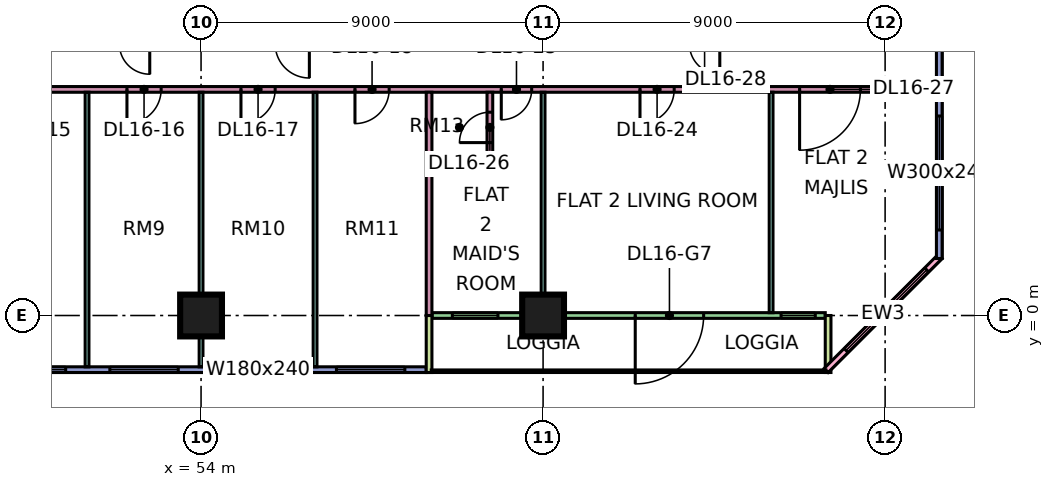
"""IFC4 building model, lengths in metres.
Left out: names, types, materials, properties, quantities, classifications, styles, units other than length and angle.
Written with IfcOpenShell. Run it as: python <this file> out.ifc"""

import sys

from ifc_helpers import new_model, si_unit, direction, frame, frame_2d, origin, origin_2d, place, context, subcontext, project, spatial, rectangle, extrude, element, fill, save


model = new_model("IFC4")
c1 = context("Model", 3, precision=1e-05, world=origin(), true_north=direction((0.0, 1.0)))
c2 = subcontext(c1, "Body", "Model", "MODEL_VIEW")
j1 = project(units=[si_unit("LENGTHUNIT", "METRE"), si_unit("PLANEANGLEUNIT", "RADIAN")], contexts=[c1])
p1 = place(None, origin())
s1 = spatial("IfcSite", under=j1, at=p1, CompositionType="ELEMENT")
p2 = place(p1, origin())
s2 = spatial("IfcBuilding", under=s1, at=p2, CompositionType="ELEMENT")
p3 = place(p2, frame((0.0, 0.0, 75.15)))
s3 = spatial("IfcBuildingStorey", under=s2, at=p3, CompositionType="ELEMENT", Elevation=75.15)
for number, where, z_axis, x_axis in (
    (1, (54.0, 0.0, 0.0), (0.0, 0.0, 1.0), (1.0, 0.0, 0.0)),
    (2, (63.0, 0.0, 0.0), (0.0, 0.0, 1.0), (1.0, 0.0, 0.0)),
):
    element("IfcColumn", number, at=place(p3, frame(where, z_axis=z_axis, x_axis=x_axis)), inside=s3, PredefinedType="COLUMN", context=c2, shape_type="SweptSolid", body=[
        extrude(rectangle(XDim=1.1, YDim=1.1, at=origin_2d()), origin(), (0.0, 0.0, 1.0), 3.75),
    ])
p4 = place(p3, frame((48.075, -1.425, 0.0), z_axis=(0.0, 0.0, 1.0), x_axis=(1.0, 0.0, 0.0)))
e3 = element("IfcWall", 3, at=p4, inside=s3, PredefinedType="SOLIDWALL", context=c2, shape_type="SweptSolid", body=[
    extrude(rectangle(XDim=11.85, YDim=0.15, at=frame_2d((5.925, 0.0))), origin(), (0.0, 0.0, 1.0), 3.35),
])
p5 = place(p4, frame((0.562, 0.0, 0.45)))
e4 = element("IfcOpeningElement", 4, at=p5, cuts=e3, PredefinedType="OPENING", context=c2, shape_type="SweptSolid", body=[
    extrude(rectangle(XDim=1.8, YDim=2.4, at=frame_2d((0.9, 1.2))), frame((0.0, 0.085, 0.0), z_axis=(0.0, -1.0, 0.0), x_axis=(1.0, 0.0, 0.0)), (0.0, 0.0, 1.0), 0.17),
])
p6 = place(p4, frame((3.525, 0.0, 0.45)))
e5 = element("IfcOpeningElement", 5, at=p6, cuts=e3, PredefinedType="OPENING", context=c2, shape_type="SweptSolid", body=[
    extrude(rectangle(XDim=1.8, YDim=2.4, at=frame_2d((0.9, 1.2))), frame((0.0, 0.085, 0.0), z_axis=(0.0, -1.0, 0.0), x_axis=(1.0, 0.0, 0.0)), (0.0, 0.0, 1.0), 0.17),
])
p7 = place(p4, frame((6.525, 0.0, 0.45)))
e6 = element("IfcOpeningElement", 6, at=p7, cuts=e3, PredefinedType="OPENING", context=c2, shape_type="SweptSolid", body=[
    extrude(rectangle(XDim=1.8, YDim=2.4, at=frame_2d((0.9, 1.2))), frame((0.0, 0.085, 0.0), z_axis=(0.0, -1.0, 0.0), x_axis=(1.0, 0.0, 0.0)), (0.0, 0.0, 1.0), 0.17),
])
p8 = place(p4, frame((9.488, 0.0, 0.45)))
e7 = element("IfcOpeningElement", 7, at=p8, cuts=e3, PredefinedType="OPENING", context=c2, shape_type="SweptSolid", body=[
    extrude(rectangle(XDim=1.8, YDim=2.4, at=frame_2d((0.9, 1.2))), frame((0.0, 0.085, 0.0), z_axis=(0.0, -1.0, 0.0), x_axis=(1.0, 0.0, 0.0)), (0.0, 0.0, 1.0), 0.17),
])
p9 = place(p3, frame((60.075, 0.0, 0.0), z_axis=(0.0, 0.0, 1.0), x_axis=(1.0, 0.0, 0.0)))
e8 = element("IfcWall", 8, at=p9, inside=s3, PredefinedType="SOLIDWALL", context=c2, shape_type="SweptSolid", body=[
    extrude(rectangle(XDim=10.35, YDim=0.15, at=frame_2d((5.175, 0.0))), origin(), (0.0, 0.0, 1.0), 3.35),
])
p10 = place(p9, frame((0.538, 0.0, 0.45)))
e9 = element("IfcOpeningElement", 9, at=p10, cuts=e8, PredefinedType="OPENING", context=c2, shape_type="SweptSolid", body=[
    extrude(rectangle(XDim=1.2, YDim=2.4, at=frame_2d((0.6, 1.2))), frame((0.0, 0.085, 0.0), z_axis=(0.0, -1.0, 0.0), x_axis=(1.0, 0.0, 0.0)), (0.0, 0.0, 1.0), 0.17),
])
p11 = place(p9, frame((5.35, 0.0, 0.0)))
e10 = element("IfcOpeningElement", 10, at=p11, cuts=e8, PredefinedType="OPENING", context=c2, shape_type="SweptSolid", body=[
    extrude(rectangle(XDim=1.8, YDim=2.4, at=frame_2d((0.9, 1.2))), frame((0.0, 0.085, 0.0), z_axis=(0.0, -1.0, 0.0), x_axis=(1.0, 0.0, 0.0)), (0.0, 0.0, 1.0), 0.17),
])
p12 = place(p9, frame((9.188, 0.0, 0.45)))
e11 = element("IfcOpeningElement", 11, at=p12, cuts=e8, PredefinedType="OPENING", context=c2, shape_type="SweptSolid", body=[
    extrude(rectangle(XDim=0.9, YDim=2.4, at=frame_2d((0.45, 1.2))), frame((0.0, 0.085, 0.0), z_axis=(0.0, -1.0, 0.0), x_axis=(1.0, 0.0, 0.0)), (0.0, 0.0, 1.0), 0.17),
])
for number, where, z_axis, x_axis in (
    (12, (60.0, -1.5, 0.0), (0.0, 0.0, 1.0), (0.0, 1.0, 0.0)),
    (13, (70.5, -1.5, 0.0), (0.0, 0.0, 1.0), (0.0, 1.0, 0.0)),
):
    element("IfcWall", number, at=place(p3, frame(where, z_axis=z_axis, x_axis=x_axis)), inside=s3, PredefinedType="SOLIDWALL", context=c2, shape_type="SweptSolid", body=[
        extrude(rectangle(XDim=1.5, YDim=0.15, at=frame_2d((0.75, 0.0))), origin(), (0.0, 0.0, 1.0), 3.35),
    ])
p13 = place(p3, frame((70.447, -1.447, 0.0), z_axis=(0.0, 0.0, 1.0), x_axis=(0.707106781187, 0.707106781187, 0.0)))
e14 = element("IfcWall", 14, at=p13, inside=s3, PredefinedType="SOLIDWALL", context=c2, shape_type="SweptSolid", body=[
    extrude(rectangle(XDim=4.243, YDim=0.15, at=frame_2d((2.121, 0.0))), origin(), (0.0, 0.0, 1.0), 3.35),
])
p14 = place(p13, frame((0.744, 0.0, 0.45)))
e15 = element("IfcOpeningElement", 15, at=p14, cuts=e14, PredefinedType="OPENING", context=c2, shape_type="SweptSolid", body=[
    extrude(rectangle(XDim=3.0, YDim=2.4, at=frame_2d((1.5, 1.2))), frame((0.0, 0.085, 0.0), z_axis=(0.0, -1.0, 0.0), x_axis=(1.0, 0.0, 0.0)), (0.0, 0.0, 1.0), 0.17),
])
p15 = place(p3, frame((73.425, 1.5, 0.0), z_axis=(0.0, 0.0, 1.0), x_axis=(0.0, 1.0, 0.0)))
e16 = element("IfcWall", 16, at=p15, inside=s3, PredefinedType="SOLIDWALL", context=c2, shape_type="SweptSolid", body=[
    extrude(rectangle(XDim=10.425, YDim=0.15, at=frame_2d((5.212, 0.0))), origin(), (0.0, 0.0, 1.0), 3.35),
])
p16 = place(p15, frame((0.75, 0.0, 0.45)))
e17 = element("IfcOpeningElement", 17, at=p16, cuts=e16, PredefinedType="OPENING", context=c2, shape_type="SweptSolid", body=[
    extrude(rectangle(XDim=3.0, YDim=2.4, at=frame_2d((1.5, 1.2))), frame((0.0, 0.085, 0.0), z_axis=(0.0, -1.0, 0.0), x_axis=(1.0, 0.0, 0.0)), (0.0, 0.0, 1.0), 0.17),
])
p17 = place(p3, frame((48.1, 5.95, 0.0), z_axis=(0.0, 0.0, 1.0), x_axis=(1.0, 0.0, 0.0)))
e18 = element("IfcWall", 18, at=p17, inside=s3, PredefinedType="PARTITIONING", context=c2, shape_type="SweptSolid", body=[
    extrude(rectangle(XDim=25.25, YDim=0.15, at=frame_2d((12.625, 0.0))), origin(), (0.0, 0.0, 1.0), 3.35),
])
p18 = place(p17, frame((0.95, 0.0, 0.0)))
e19 = element("IfcOpeningElement", 19, at=p18, cuts=e18, PredefinedType="OPENING", context=c2, shape_type="SweptSolid", body=[
    extrude(rectangle(XDim=0.9, YDim=2.1, at=frame_2d((0.45, 1.05))), frame((0.0, 0.085, 0.0), z_axis=(0.0, -1.0, 0.0), x_axis=(1.0, 0.0, 0.0)), (0.0, 0.0, 1.0), 0.17),
])
p19 = place(p17, frame((3.95, 0.0, 0.0)))
e20 = element("IfcOpeningElement", 20, at=p19, cuts=e18, PredefinedType="OPENING", context=c2, shape_type="SweptSolid", body=[
    extrude(rectangle(XDim=0.9, YDim=2.1, at=frame_2d((0.45, 1.05))), frame((0.0, 0.085, 0.0), z_axis=(0.0, -1.0, 0.0), x_axis=(1.0, 0.0, 0.0)), (0.0, 0.0, 1.0), 0.17),
])
p20 = place(p17, frame((6.95, 0.0, 0.0)))
e21 = element("IfcOpeningElement", 21, at=p20, cuts=e18, PredefinedType="OPENING", context=c2, shape_type="SweptSolid", body=[
    extrude(rectangle(XDim=0.9, YDim=2.1, at=frame_2d((0.45, 1.05))), frame((0.0, 0.085, 0.0), z_axis=(0.0, -1.0, 0.0), x_axis=(1.0, 0.0, 0.0)), (0.0, 0.0, 1.0), 0.17),
])
p21 = place(p17, frame((9.95, 0.0, 0.0)))
e22 = element("IfcOpeningElement", 22, at=p21, cuts=e18, PredefinedType="OPENING", context=c2, shape_type="SweptSolid", body=[
    extrude(rectangle(XDim=0.9, YDim=2.1, at=frame_2d((0.45, 1.05))), frame((0.0, 0.085, 0.0), z_axis=(0.0, -1.0, 0.0), x_axis=(1.0, 0.0, 0.0)), (0.0, 0.0, 1.0), 0.17),
])
p22 = place(p17, frame((17.45, 0.0, 0.0)))
e23 = element("IfcOpeningElement", 23, at=p22, cuts=e18, PredefinedType="OPENING", context=c2, shape_type="SweptSolid", body=[
    extrude(rectangle(XDim=0.9, YDim=2.1, at=frame_2d((0.45, 1.05))), frame((0.0, 0.085, 0.0), z_axis=(0.0, -1.0, 0.0), x_axis=(1.0, 0.0, 0.0)), (0.0, 0.0, 1.0), 0.17),
])
p23 = place(p17, frame((13.8, 0.0, 0.0)))
e24 = element("IfcOpeningElement", 24, at=p23, cuts=e18, PredefinedType="OPENING", context=c2, shape_type="SweptSolid", body=[
    extrude(rectangle(XDim=0.8, YDim=2.1, at=frame_2d((0.4, 1.05))), frame((0.0, 0.085, 0.0), z_axis=(0.0, -1.0, 0.0), x_axis=(1.0, 0.0, 0.0)), (0.0, 0.0, 1.0), 0.17),
])
p24 = place(p17, frame((21.65, 0.0, 0.0)))
e25 = element("IfcOpeningElement", 25, at=p24, cuts=e18, PredefinedType="OPENING", context=c2, shape_type="SweptSolid", body=[
    extrude(rectangle(XDim=1.6, YDim=2.1, at=frame_2d((0.8, 1.05))), frame((0.0, 0.085, 0.0), z_axis=(0.0, -1.0, 0.0), x_axis=(1.0, 0.0, 0.0)), (0.0, 0.0, 1.0), 0.17),
])
for number, where, z_axis, x_axis in (
    (26, (51.0, -1.351, 0.0), (0.0, 0.0, 1.0), (0.0, 1.0, 0.0)),
    (27, (54.0, -1.351, 0.0), (0.0, 0.0, 1.0), (0.0, 1.0, 0.0)),
    (28, (57.0, -1.351, 0.0), (0.0, 0.0, 1.0), (0.0, 1.0, 0.0)),
):
    element("IfcWall", number, at=place(p3, frame(where, z_axis=z_axis, x_axis=x_axis)), inside=s3, PredefinedType="PARTITIONING", context=c2, shape_type="SweptSolid", body=[
        extrude(rectangle(XDim=7.226, YDim=0.1, at=frame_2d((3.613, 0.0))), origin(), (0.0, 0.0, 1.0), 3.35),
    ])
p25 = place(p3, frame((60.0, 0.0, 0.0), z_axis=(0.0, 0.0, 1.0), x_axis=(0.0, 1.0, 0.0)))
e29 = element("IfcWall", 29, at=p25, inside=s3, PredefinedType="PARTITIONING", context=c2, shape_type="SweptSolid", body=[
    extrude(rectangle(XDim=5.875, YDim=0.15, at=frame_2d((2.938, 0.0))), origin(), (0.0, 0.0, 1.0), 3.35),
])
p26 = place(p3, frame((60.075, 3.95, 0.0), z_axis=(0.0, 0.0, 1.0), x_axis=(1.0, 0.0, 0.0)))
e30 = element("IfcWall", 30, at=p26, inside=s3, PredefinedType="PARTITIONING", context=c2, shape_type="SweptSolid", body=[
    extrude(rectangle(XDim=1.45, YDim=0.15, at=frame_2d((0.725, 0.0))), origin(), (0.0, 0.0, 1.0), 3.35),
])
p27 = place(p3, frame((61.6, 3.875, 0.0), z_axis=(0.0, 0.0, 1.0), x_axis=(0.0, 1.0, 0.0)))
e31 = element("IfcWall", 31, at=p27, inside=s3, PredefinedType="PARTITIONING", context=c2, shape_type="SweptSolid", body=[
    extrude(rectangle(XDim=2.0, YDim=0.15, at=frame_2d((1.0, 0.0))), origin(), (0.0, 0.0, 1.0), 3.35),
])
p28 = place(p27, frame((0.675, 0.0, 0.0)))
e32 = element("IfcOpeningElement", 32, at=p28, cuts=e31, PredefinedType="OPENING", context=c2, shape_type="SweptSolid", body=[
    extrude(rectangle(XDim=0.8, YDim=2.1, at=frame_2d((0.4, 1.05))), frame((0.0, 0.085, 0.0), z_axis=(0.0, -1.0, 0.0), x_axis=(1.0, 0.0, 0.0)), (0.0, 0.0, 1.0), 0.17),
])
for number, where, z_axis, x_axis in (
    (33, (63.0, 0.074, 0.0), (0.0, 0.0, 1.0), (0.0, 1.0, 0.0)),
    (34, (69.0, 0.074, 0.0), (0.0, 0.0, 1.0), (0.0, 1.0, 0.0)),
):
    element("IfcWall", number, at=place(p3, frame(where, z_axis=z_axis, x_axis=x_axis)), inside=s3, PredefinedType="PARTITIONING", context=c2, shape_type="SweptSolid", body=[
        extrude(rectangle(XDim=5.801, YDim=0.1, at=frame_2d((2.9, 0.0))), origin(), (0.0, 0.0, 1.0), 3.35),
    ])
p29 = place(p5, origin())
e35 = element("IfcWindow", 35, at=p29, inside=s3, PartitioningType="SINGLE_PANEL", PredefinedType="WINDOW", context=c2, shape_type="SweptSolid", body=[
    extrude(rectangle(XDim=1.8, YDim=2.4, at=frame_2d((0.9, 1.2))), frame((0.0, 0.03, 0.0), z_axis=(0.0, -1.0, 0.0), x_axis=(1.0, 0.0, 0.0)), (0.0, 0.0, 1.0), 0.06),
])
fill(e4, e35)
p30 = place(p6, origin())
e36 = element("IfcWindow", 36, at=p30, inside=s3, PartitioningType="SINGLE_PANEL", PredefinedType="WINDOW", context=c2, shape_type="SweptSolid", body=[
    extrude(rectangle(XDim=1.8, YDim=2.4, at=frame_2d((0.9, 1.2))), frame((0.0, 0.03, 0.0), z_axis=(0.0, -1.0, 0.0), x_axis=(1.0, 0.0, 0.0)), (0.0, 0.0, 1.0), 0.06),
])
fill(e5, e36)
p31 = place(p7, origin())
e37 = element("IfcWindow", 37, at=p31, inside=s3, PartitioningType="SINGLE_PANEL", PredefinedType="WINDOW", context=c2, shape_type="SweptSolid", body=[
    extrude(rectangle(XDim=1.8, YDim=2.4, at=frame_2d((0.9, 1.2))), frame((0.0, 0.03, 0.0), z_axis=(0.0, -1.0, 0.0), x_axis=(1.0, 0.0, 0.0)), (0.0, 0.0, 1.0), 0.06),
])
fill(e6, e37)
p32 = place(p8, origin())
e38 = element("IfcWindow", 38, at=p32, inside=s3, PartitioningType="SINGLE_PANEL", PredefinedType="WINDOW", context=c2, shape_type="SweptSolid", body=[
    extrude(rectangle(XDim=1.8, YDim=2.4, at=frame_2d((0.9, 1.2))), frame((0.0, 0.03, 0.0), z_axis=(0.0, -1.0, 0.0), x_axis=(1.0, 0.0, 0.0)), (0.0, 0.0, 1.0), 0.06),
])
fill(e7, e38)
p33 = place(p10, origin())
e39 = element("IfcWindow", 39, at=p33, inside=s3, PartitioningType="SINGLE_PANEL", PredefinedType="WINDOW", context=c2, shape_type="SweptSolid", body=[
    extrude(rectangle(XDim=1.2, YDim=2.4, at=frame_2d((0.6, 1.2))), frame((0.0, 0.03, 0.0), z_axis=(0.0, -1.0, 0.0), x_axis=(1.0, 0.0, 0.0)), (0.0, 0.0, 1.0), 0.06),
])
fill(e9, e39)
p34 = place(p11, frame((1.8, 0.0, 0.0), z_axis=(0.0, 0.0, 1.0), x_axis=(-1.0, 0.0, 0.0)))
e40 = element("IfcDoor", 40, at=p34, inside=s3, OperationType="DOUBLE_DOOR_SINGLE_SWING", PredefinedType="DOOR", context=c2, shape_type="SweptSolid", body=[
    extrude(rectangle(XDim=1.8, YDim=2.4, at=frame_2d((0.9, 1.2))), frame((0.0, 0.025, 0.0), z_axis=(0.0, -1.0, 0.0), x_axis=(1.0, 0.0, 0.0)), (0.0, 0.0, 1.0), 0.05),
])
fill(e10, e40)
p35 = place(p12, origin())
e41 = element("IfcWindow", 41, at=p35, inside=s3, PartitioningType="SINGLE_PANEL", PredefinedType="WINDOW", context=c2, shape_type="SweptSolid", body=[
    extrude(rectangle(XDim=0.9, YDim=2.4, at=frame_2d((0.45, 1.2))), frame((0.0, 0.03, 0.0), z_axis=(0.0, -1.0, 0.0), x_axis=(1.0, 0.0, 0.0)), (0.0, 0.0, 1.0), 0.06),
])
fill(e11, e41)
p36 = place(p14, origin())
e42 = element("IfcWindow", 42, at=p36, inside=s3, PartitioningType="SINGLE_PANEL", PredefinedType="WINDOW", context=c2, shape_type="SweptSolid", body=[
    extrude(rectangle(XDim=3.0, YDim=2.4, at=frame_2d((1.5, 1.2))), frame((0.0, 0.03, 0.0), z_axis=(0.0, -1.0, 0.0), x_axis=(1.0, 0.0, 0.0)), (0.0, 0.0, 1.0), 0.06),
])
fill(e15, e42)
p37 = place(p16, origin())
e43 = element("IfcWindow", 43, at=p37, inside=s3, PartitioningType="SINGLE_PANEL", PredefinedType="WINDOW", context=c2, shape_type="SweptSolid", body=[
    extrude(rectangle(XDim=3.0, YDim=2.4, at=frame_2d((1.5, 1.2))), frame((0.0, 0.03, 0.0), z_axis=(0.0, -1.0, 0.0), x_axis=(1.0, 0.0, 0.0)), (0.0, 0.0, 1.0), 0.06),
])
fill(e17, e43)
p38 = place(p19, frame((0.9, 0.0, 0.0), z_axis=(0.0, 0.0, 1.0), x_axis=(-1.0, 0.0, 0.0)))
e44 = element("IfcDoor", 44, at=p38, inside=s3, OperationType="SINGLE_SWING_LEFT", PredefinedType="DOOR", context=c2, shape_type="SweptSolid", body=[
    extrude(rectangle(XDim=0.9, YDim=2.1, at=frame_2d((0.45, 1.05))), frame((0.0, 0.025, 0.0), z_axis=(0.0, -1.0, 0.0), x_axis=(1.0, 0.0, 0.0)), (0.0, 0.0, 1.0), 0.05),
])
fill(e20, e44)
p39 = place(p20, frame((0.9, 0.0, 0.0), z_axis=(0.0, 0.0, 1.0), x_axis=(-1.0, 0.0, 0.0)))
e45 = element("IfcDoor", 45, at=p39, inside=s3, OperationType="SINGLE_SWING_LEFT", PredefinedType="DOOR", context=c2, shape_type="SweptSolid", body=[
    extrude(rectangle(XDim=0.9, YDim=2.1, at=frame_2d((0.45, 1.05))), frame((0.0, 0.025, 0.0), z_axis=(0.0, -1.0, 0.0), x_axis=(1.0, 0.0, 0.0)), (0.0, 0.0, 1.0), 0.05),
])
fill(e21, e45)
p40 = place(p21, frame((0.9, 0.0, 0.0), z_axis=(0.0, 0.0, 1.0), x_axis=(-1.0, 0.0, 0.0)))
e46 = element("IfcDoor", 46, at=p40, inside=s3, OperationType="SINGLE_SWING_LEFT", PredefinedType="DOOR", context=c2, shape_type="SweptSolid", body=[
    extrude(rectangle(XDim=0.9, YDim=2.1, at=frame_2d((0.45, 1.05))), frame((0.0, 0.025, 0.0), z_axis=(0.0, -1.0, 0.0), x_axis=(1.0, 0.0, 0.0)), (0.0, 0.0, 1.0), 0.05),
])
fill(e22, e46)
p41 = place(p22, frame((0.9, 0.0, 0.0), z_axis=(0.0, 0.0, 1.0), x_axis=(-1.0, 0.0, 0.0)))
e47 = element("IfcDoor", 47, at=p41, inside=s3, OperationType="SINGLE_SWING_LEFT", PredefinedType="DOOR", context=c2, shape_type="SweptSolid", body=[
    extrude(rectangle(XDim=0.9, YDim=2.1, at=frame_2d((0.45, 1.05))), frame((0.0, 0.025, 0.0), z_axis=(0.0, -1.0, 0.0), x_axis=(1.0, 0.0, 0.0)), (0.0, 0.0, 1.0), 0.05),
])
fill(e23, e47)
p42 = place(p23, frame((0.8, 0.0, 0.0), z_axis=(0.0, 0.0, 1.0), x_axis=(-1.0, 0.0, 0.0)))
e48 = element("IfcDoor", 48, at=p42, inside=s3, OperationType="SINGLE_SWING_LEFT", PredefinedType="DOOR", context=c2, shape_type="SweptSolid", body=[
    extrude(rectangle(XDim=0.8, YDim=2.1, at=frame_2d((0.4, 1.05))), frame((0.0, 0.025, 0.0), z_axis=(0.0, -1.0, 0.0), x_axis=(1.0, 0.0, 0.0)), (0.0, 0.0, 1.0), 0.05),
])
fill(e24, e48)
p43 = place(p28, origin())
e49 = element("IfcDoor", 49, at=p43, inside=s3, OperationType="SINGLE_SWING_LEFT", PredefinedType="DOOR", context=c2, shape_type="SweptSolid", body=[
    extrude(rectangle(XDim=0.8, YDim=2.1, at=frame_2d((0.4, 1.05))), frame((0.0, 0.025, 0.0), z_axis=(0.0, -1.0, 0.0), x_axis=(1.0, 0.0, 0.0)), (0.0, 0.0, 1.0), 0.05),
])
fill(e32, e49)
p44 = place(p24, frame((1.6, 0.0, 0.0), z_axis=(0.0, 0.0, 1.0), x_axis=(-1.0, 0.0, 0.0)))
e50 = element("IfcDoor", 50, at=p44, inside=s3, OperationType="DOUBLE_DOOR_SINGLE_SWING", PredefinedType="DOOR", context=c2, shape_type="SweptSolid", body=[
    extrude(rectangle(XDim=1.6, YDim=2.1, at=frame_2d((0.8, 1.05))), frame((0.0, 0.025, 0.0), z_axis=(0.0, -1.0, 0.0), x_axis=(1.0, 0.0, 0.0)), (0.0, 0.0, 1.0), 0.05),
])
fill(e25, e50)
save(model, sys.argv[1])
